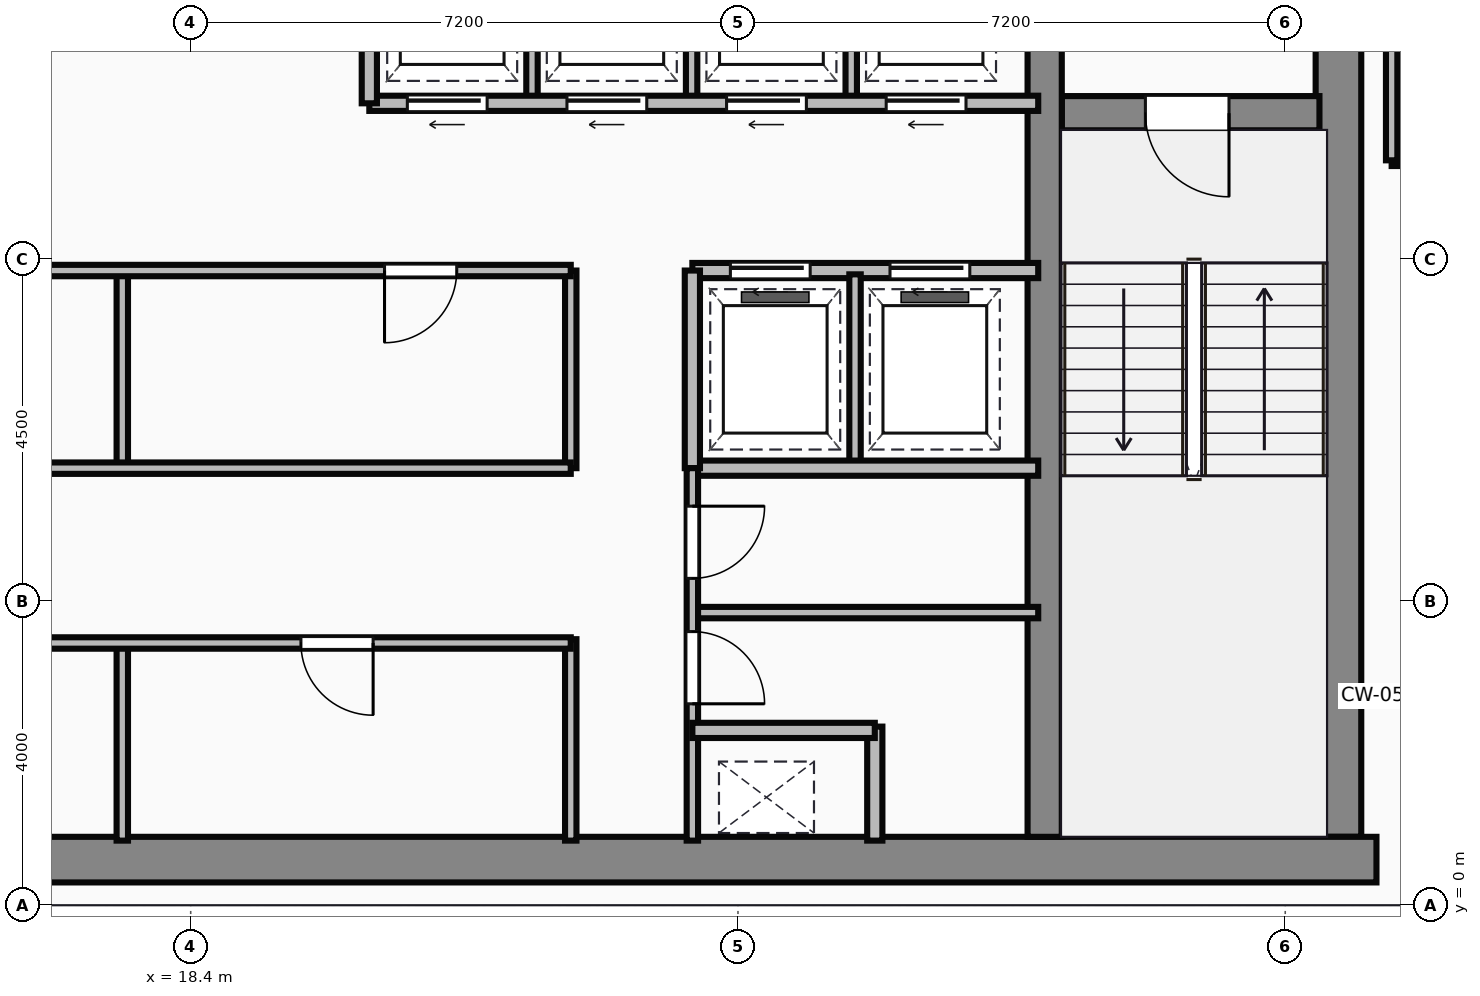
"""IFC4 building model, lengths in metres.
Left out: names, types, materials, properties, quantities, classifications, styles, units other than length and angle.
Written with IfcOpenShell. Run it as: python <this file> out.ifc"""

import sys

from ifc_helpers import new_model, si_unit, direction, frame, frame_2d, origin, place, context, subcontext, project, spatial, rectangle, extrude, source, transform, mapped, element, fill, save


model = new_model("IFC4")
c1 = context("Model", 3, precision=1e-05, world=origin(), true_north=direction((0.0, 1.0)))
c2 = subcontext(c1, "Body", "Model", "MODEL_VIEW")
j1 = project(units=[si_unit("LENGTHUNIT", "METRE"), si_unit("PLANEANGLEUNIT", "RADIAN")], contexts=[c1])
p1 = place(None, origin())
s1 = spatial("IfcSite", under=j1, at=p1, CompositionType="ELEMENT")
p2 = place(p1, origin())
s2 = spatial("IfcBuilding", under=s1, at=p2, CompositionType="ELEMENT")
p3 = place(p2, frame((0.0, 0.0, 266.1)))
s3 = spatial("IfcBuildingStorey", under=s2, at=p3, CompositionType="ELEMENT", Elevation=266.1)
m1 = source(origin(), c2, "Body", "SweptSolid", [
    extrude(rectangle(XDim=29.5, YDim=0.6, at=frame_2d((14.75, 0.0))), origin(), (0.0, 0.0, 1.0), 3.65),
])
p4 = place(p3, frame((4.5, 0.6, 0.0), z_axis=(0.0, 0.0, 1.0), x_axis=(1.0, 0.0, 0.0)))
e1 = element("IfcWall", 1, at=p4, inside=s3, PredefinedType="SHEAR", context=c2, shape_type="MappedRepresentation", body=[
    mapped(m1, transform((0.0, 0.0, 0.0))),
])
m2 = source(origin(), c2, "Body", "SweptSolid", [
    extrude(rectangle(XDim=13.1, YDim=0.6, at=frame_2d((6.55, 0.0))), origin(), (0.0, 0.0, 1.0), 3.65),
])
p5 = place(p3, frame((33.5, 0.9, 0.0), z_axis=(0.0, 0.0, 1.0), x_axis=(0.0, 1.0, 0.0)))
e2 = element("IfcWall", 2, at=p5, inside=s3, PredefinedType="SHEAR", context=c2, shape_type="MappedRepresentation", body=[
    mapped(m2, transform((0.0, 0.0, 0.0))),
])
m3 = source(origin(), c2, "Body", "SweptSolid", [
    extrude(rectangle(XDim=12.5, YDim=0.45, at=frame_2d((6.25, 0.0))), origin(), (0.0, 0.0, 1.0), 3.65),
])
p6 = place(p3, frame((29.635, 0.9, 0.0), z_axis=(0.0, 0.0, 1.0), x_axis=(0.0, 1.0, 0.0)))
e3 = element("IfcWall", 3, at=p6, inside=s3, PredefinedType="SHEAR", context=c2, shape_type="MappedRepresentation", body=[
    mapped(m3, transform((0.0, 0.0, 0.0))),
])
m4 = source(origin(), c2, "Body", "SweptSolid", [
    extrude(rectangle(XDim=3.39, YDim=0.45, at=frame_2d((1.695, 0.0))), origin(), (0.0, 0.0, 1.0), 3.65),
])
p7 = place(p3, frame((29.86, 10.42, 0.0), z_axis=(0.0, 0.0, 1.0), x_axis=(1.0, 0.0, 0.0)))
e4 = element("IfcWall", 4, at=p7, inside=s3, PredefinedType="SHEAR", context=c2, shape_type="MappedRepresentation", body=[
    mapped(m4, transform((0.0, 0.0, 0.0))),
])
p8 = place(p7, frame((1.1, 0.0, 0.0)))
e5 = element("IfcOpeningElement", 5, at=p8, cuts=e4, PredefinedType="OPENING", context=c2, shape_type="SweptSolid", body=[
    extrude(rectangle(XDim=1.1, YDim=2.15, at=frame_2d((0.55, 1.075))), frame((0.0, 0.235, 0.0), z_axis=(0.0, -1.0, 0.0), x_axis=(1.0, 0.0, 0.0)), (0.0, 0.0, 1.0), 0.47),
])
m5 = source(origin(), c2, "Body", "SweptSolid", [
    extrude(rectangle(XDim=10.35, YDim=0.15, at=frame_2d((5.175, 0.0))), origin(), (0.0, 0.0, 1.0), 3.4),
])
p9 = place(p3, frame((13.05, 3.45, 0.0), z_axis=(0.0, 0.0, 1.0), x_axis=(1.0, 0.0, 0.0)))
e6 = element("IfcWall", 6, at=p9, inside=s3, PredefinedType="PARTITIONING", context=c2, shape_type="MappedRepresentation", body=[
    mapped(m5, transform((0.0, 0.0, 0.0))),
])
p10 = place(p9, frame((2.1, 0.0, 0.0)))
e7 = element("IfcOpeningElement", 7, at=p10, cuts=e6, PredefinedType="OPENING", context=c2, shape_type="SweptSolid", body=[
    extrude(rectangle(XDim=0.95, YDim=2.15, at=frame_2d((0.475, 1.075))), frame((0.0, 0.085, 0.0), z_axis=(0.0, -1.0, 0.0), x_axis=(1.0, 0.0, 0.0)), (0.0, 0.0, 1.0), 0.17),
])
p11 = place(p9, frame((6.8, 0.0, 0.0)))
e8 = element("IfcOpeningElement", 8, at=p11, cuts=e6, PredefinedType="OPENING", context=c2, shape_type="SweptSolid", body=[
    extrude(rectangle(XDim=0.95, YDim=2.15, at=frame_2d((0.475, 1.075))), frame((0.0, 0.085, 0.0), z_axis=(0.0, -1.0, 0.0), x_axis=(1.0, 0.0, 0.0)), (0.0, 0.0, 1.0), 0.17),
])
m6 = source(origin(), c2, "Body", "SweptSolid", [
    extrude(rectangle(XDim=2.65, YDim=0.15, at=frame_2d((1.325, 0.0))), origin(), (0.0, 0.0, 1.0), 3.4),
])
p12 = place(p3, frame((23.4, 0.85, 0.0), z_axis=(0.0, 0.0, 1.0), x_axis=(0.0, 1.0, 0.0)))
e9 = element("IfcWall", 9, at=p12, inside=s3, PredefinedType="PARTITIONING", context=c2, shape_type="MappedRepresentation", body=[
    mapped(m6, transform((0.0, 0.0, 0.0))),
])
m7 = source(origin(), c2, "Body", "SweptSolid", [
    extrude(rectangle(XDim=2.6, YDim=0.15, at=frame_2d((1.3, 0.0))), origin(), (0.0, 0.0, 1.0), 3.4),
])
p13 = place(p3, frame((17.5, 0.85, 0.0), z_axis=(0.0, 0.0, 1.0), x_axis=(0.0, 1.0, 0.0)))
e10 = element("IfcWall", 10, at=p13, inside=s3, PredefinedType="PARTITIONING", context=c2, shape_type="MappedRepresentation", body=[
    mapped(m7, transform((0.0, 0.0, 0.0))),
])
m8 = source(origin(), c2, "Body", "SweptSolid", [
    extrude(rectangle(XDim=11.85, YDim=0.15, at=frame_2d((5.925, 0.0))), origin(), (0.0, 0.0, 1.0), 3.4),
])
p14 = place(p3, frame((11.55, 5.75, 0.0), z_axis=(0.0, 0.0, 1.0), x_axis=(1.0, 0.0, 0.0)))
e11 = element("IfcWall", 11, at=p14, inside=s3, PredefinedType="PARTITIONING", context=c2, shape_type="MappedRepresentation", body=[
    mapped(m8, transform((0.0, 0.0, 0.0))),
])
p15 = place(p3, frame((11.55, 8.35, 0.0), z_axis=(0.0, 0.0, 1.0), x_axis=(1.0, 0.0, 0.0)))
e12 = element("IfcWall", 12, at=p15, inside=s3, PredefinedType="PARTITIONING", context=c2, shape_type="MappedRepresentation", body=[
    mapped(m8, transform((0.0, 0.0, 0.0))),
])
p16 = place(p15, frame((1.1, 0.0, 0.0)))
e13 = element("IfcOpeningElement", 13, at=p16, cuts=e12, PredefinedType="OPENING", context=c2, shape_type="SweptSolid", body=[
    extrude(rectangle(XDim=0.95, YDim=2.15, at=frame_2d((0.475, 1.075))), frame((0.0, 0.085, 0.0), z_axis=(0.0, -1.0, 0.0), x_axis=(1.0, 0.0, 0.0)), (0.0, 0.0, 1.0), 0.17),
])
p17 = place(p15, frame((9.4, 0.0, 0.0)))
e14 = element("IfcOpeningElement", 14, at=p17, cuts=e12, PredefinedType="OPENING", context=c2, shape_type="SweptSolid", body=[
    extrude(rectangle(XDim=0.95, YDim=2.15, at=frame_2d((0.475, 1.075))), frame((0.0, 0.085, 0.0), z_axis=(0.0, -1.0, 0.0), x_axis=(1.0, 0.0, 0.0)), (0.0, 0.0, 1.0), 0.17),
])
m9 = source(origin(), c2, "Body", "SweptSolid", [
    extrude(rectangle(XDim=2.6, YDim=0.15, at=frame_2d((1.3, 0.0))), origin(), (0.0, 0.0, 1.0), 3.4),
])
p18 = place(p3, frame((23.4, 5.75, 0.0), z_axis=(0.0, 0.0, 1.0), x_axis=(0.0, 1.0, 0.0)))
e15 = element("IfcWall", 15, at=p18, inside=s3, PredefinedType="PARTITIONING", context=c2, shape_type="MappedRepresentation", body=[
    mapped(m9, transform((0.0, 0.0, 0.0))),
])
m10 = source(origin(), c2, "Body", "SweptSolid", [
    extrude(rectangle(XDim=2.5, YDim=0.15, at=frame_2d((1.25, 0.0))), origin(), (0.0, 0.0, 1.0), 3.4),
])
p19 = place(p3, frame((17.5, 5.8, 0.0), z_axis=(0.0, 0.0, 1.0), x_axis=(0.0, 1.0, 0.0)))
e16 = element("IfcWall", 16, at=p19, inside=s3, PredefinedType="PARTITIONING", context=c2, shape_type="MappedRepresentation", body=[
    mapped(m10, transform((0.0, 0.0, 0.0))),
])
m11 = source(origin(), c2, "Body", "SweptSolid", [
    extrude(rectangle(XDim=8.8, YDim=0.2, at=frame_2d((4.4, 0.0))), origin(), (0.0, 0.0, 1.0), 3.4),
])
p20 = place(p3, frame((20.75, 10.55, 0.0), z_axis=(0.0, 0.0, 1.0), x_axis=(1.0, 0.0, 0.0)))
e17 = element("IfcWall", 17, at=p20, inside=s3, PredefinedType="PARTITIONING", context=c2, shape_type="MappedRepresentation", body=[
    mapped(m11, transform((0.0, 0.0, 0.0))),
])
p21 = place(p20, frame((0.5, 0.0, 0.0)))
e18 = element("IfcOpeningElement", 18, at=p21, cuts=e17, PredefinedType="OPENING", context=c2, shape_type="SweptSolid", body=[
    extrude(rectangle(XDim=1.05, YDim=2.15, at=frame_2d((0.525, 1.075))), frame((0.0, 0.11, 0.0), z_axis=(0.0, -1.0, 0.0), x_axis=(1.0, 0.0, 0.0)), (0.0, 0.0, 1.0), 0.22),
])
p22 = place(p20, frame((2.6, 0.0, 0.0)))
e19 = element("IfcOpeningElement", 19, at=p22, cuts=e17, PredefinedType="OPENING", context=c2, shape_type="SweptSolid", body=[
    extrude(rectangle(XDim=1.05, YDim=2.15, at=frame_2d((0.525, 1.075))), frame((0.0, 0.11, 0.0), z_axis=(0.0, -1.0, 0.0), x_axis=(1.0, 0.0, 0.0)), (0.0, 0.0, 1.0), 0.22),
])
p23 = place(p20, frame((4.7, 0.0, 0.0)))
e20 = element("IfcOpeningElement", 20, at=p23, cuts=e17, PredefinedType="OPENING", context=c2, shape_type="SweptSolid", body=[
    extrude(rectangle(XDim=1.05, YDim=2.15, at=frame_2d((0.525, 1.075))), frame((0.0, 0.11, 0.0), z_axis=(0.0, -1.0, 0.0), x_axis=(1.0, 0.0, 0.0)), (0.0, 0.0, 1.0), 0.22),
])
p24 = place(p20, frame((6.8, 0.0, 0.0)))
e21 = element("IfcOpeningElement", 21, at=p24, cuts=e17, PredefinedType="OPENING", context=c2, shape_type="SweptSolid", body=[
    extrude(rectangle(XDim=1.05, YDim=2.15, at=frame_2d((0.525, 1.075))), frame((0.0, 0.11, 0.0), z_axis=(0.0, -1.0, 0.0), x_axis=(1.0, 0.0, 0.0)), (0.0, 0.0, 1.0), 0.22),
])
m12 = source(origin(), c2, "Body", "SweptSolid", [
    extrude(rectangle(XDim=3.0, YDim=0.2, at=frame_2d((1.5, 0.0))), origin(), (0.0, 0.0, 1.0), 3.4),
])
p25 = place(p3, frame((20.75, 10.55, 0.0), z_axis=(0.0, 0.0, 1.0), x_axis=(0.0, 1.0, 0.0)))
e22 = element("IfcWall", 22, at=p25, inside=s3, PredefinedType="PARTITIONING", context=c2, shape_type="MappedRepresentation", body=[
    mapped(m12, transform((0.0, 0.0, 0.0))),
])
m13 = source(origin(), c2, "Body", "SweptSolid", [
    extrude(rectangle(XDim=2.85, YDim=0.15, at=frame_2d((1.425, 0.0))), origin(), (0.0, 0.0, 1.0), 3.4),
])
for number, where, z_axis, x_axis in (
    (23, (22.89, 10.6, 0.0), (0.0, 0.0, 1.0), (0.0, 1.0, 0.0)),
    (24, (24.99, 10.6, 0.0), (0.0, 0.0, 1.0), (0.0, 1.0, 0.0)),
    (25, (27.09, 10.6, 0.0), (0.0, 0.0, 1.0), (0.0, 1.0, 0.0)),
):
    element("IfcWall", number, at=place(p3, frame(where, z_axis=z_axis, x_axis=x_axis)), inside=s3, PredefinedType="PARTITIONING", context=c2, shape_type="MappedRepresentation", body=[
        mapped(m13, transform((0.0, 0.0, 0.0))),
    ])
m14 = source(origin(), c2, "Body", "SweptSolid", [
    extrude(rectangle(XDim=4.55, YDim=0.2, at=frame_2d((2.275, 0.0))), origin(), (0.0, 0.0, 1.0), 3.4),
])
p26 = place(p3, frame((25.0, 8.35, 0.0), z_axis=(0.0, 0.0, 1.0), x_axis=(1.0, 0.0, 0.0)))
e26 = element("IfcWall", 26, at=p26, inside=s3, PredefinedType="PARTITIONING", context=c2, shape_type="MappedRepresentation", body=[
    mapped(m14, transform((0.0, 0.0, 0.0))),
])
p27 = place(p26, frame((0.5, 0.0, 0.0)))
e27 = element("IfcOpeningElement", 27, at=p27, cuts=e26, PredefinedType="OPENING", context=c2, shape_type="SweptSolid", body=[
    extrude(rectangle(XDim=1.05, YDim=2.15, at=frame_2d((0.525, 1.075))), frame((0.0, 0.11, 0.0), z_axis=(0.0, -1.0, 0.0), x_axis=(1.0, 0.0, 0.0)), (0.0, 0.0, 1.0), 0.22),
])
p28 = place(p26, frame((2.6, 0.0, 0.0)))
e28 = element("IfcOpeningElement", 28, at=p28, cuts=e26, PredefinedType="OPENING", context=c2, shape_type="SweptSolid", body=[
    extrude(rectangle(XDim=1.05, YDim=2.15, at=frame_2d((0.525, 1.075))), frame((0.0, 0.11, 0.0), z_axis=(0.0, -1.0, 0.0), x_axis=(1.0, 0.0, 0.0)), (0.0, 0.0, 1.0), 0.22),
])
p29 = place(p3, frame((25.0, 5.75, 0.0), z_axis=(0.0, 0.0, 1.0), x_axis=(1.0, 0.0, 0.0)))
e29 = element("IfcWall", 29, at=p29, inside=s3, PredefinedType="PARTITIONING", context=c2, shape_type="MappedRepresentation", body=[
    mapped(m14, transform((0.0, 0.0, 0.0))),
])
m15 = source(origin(), c2, "Body", "SweptSolid", [
    extrude(rectangle(XDim=2.6, YDim=0.2, at=frame_2d((1.3, 0.0))), origin(), (0.0, 0.0, 1.0), 3.4),
])
p30 = place(p3, frame((25.0, 5.75, 0.0), z_axis=(0.0, 0.0, 1.0), x_axis=(0.0, 1.0, 0.0)))
e30 = element("IfcWall", 30, at=p30, inside=s3, PredefinedType="PARTITIONING", context=c2, shape_type="MappedRepresentation", body=[
    mapped(m15, transform((0.0, 0.0, 0.0))),
])
p31 = place(p3, frame((27.14, 5.8, 0.0), z_axis=(0.0, 0.0, 1.0), x_axis=(0.0, 1.0, 0.0)))
e31 = element("IfcWall", 31, at=p31, inside=s3, PredefinedType="PARTITIONING", context=c2, shape_type="MappedRepresentation", body=[
    mapped(m10, transform((0.0, 0.0, 0.0))),
])
m16 = source(origin(), c2, "Body", "SweptSolid", [
    extrude(rectangle(XDim=4.9, YDim=0.15, at=frame_2d((2.45, 0.0))), origin(), (0.0, 0.0, 1.0), 3.4),
])
p32 = place(p3, frame((25.0, 0.85, 0.0), z_axis=(0.0, 0.0, 1.0), x_axis=(0.0, 1.0, 0.0)))
e32 = element("IfcWall", 32, at=p32, inside=s3, PredefinedType="PARTITIONING", context=c2, shape_type="MappedRepresentation", body=[
    mapped(m16, transform((0.0, 0.0, 0.0))),
])
p33 = place(p32, frame((1.8, 0.0, 0.0)))
e33 = element("IfcOpeningElement", 33, at=p33, cuts=e32, PredefinedType="OPENING", context=c2, shape_type="SweptSolid", body=[
    extrude(rectangle(XDim=0.95, YDim=2.15, at=frame_2d((0.475, 1.075))), frame((0.0, 0.085, 0.0), z_axis=(0.0, -1.0, 0.0), x_axis=(1.0, 0.0, 0.0)), (0.0, 0.0, 1.0), 0.17),
])
p34 = place(p32, frame((3.45, 0.0, 0.0)))
e34 = element("IfcOpeningElement", 34, at=p34, cuts=e32, PredefinedType="OPENING", context=c2, shape_type="SweptSolid", body=[
    extrude(rectangle(XDim=0.95, YDim=2.15, at=frame_2d((0.475, 1.075))), frame((0.0, 0.085, 0.0), z_axis=(0.0, -1.0, 0.0), x_axis=(1.0, 0.0, 0.0)), (0.0, 0.0, 1.0), 0.17),
])
m17 = source(origin(), c2, "Body", "SweptSolid", [
    extrude(rectangle(XDim=2.4, YDim=0.2, at=frame_2d((1.2, 0.0))), origin(), (0.0, 0.0, 1.0), 3.4),
])
p35 = place(p3, frame((25.0, 2.3, 0.0), z_axis=(0.0, 0.0, 1.0), x_axis=(1.0, 0.0, 0.0)))
e35 = element("IfcWall", 35, at=p35, inside=s3, PredefinedType="PARTITIONING", context=c2, shape_type="MappedRepresentation", body=[
    mapped(m17, transform((0.0, 0.0, 0.0))),
])
m18 = source(origin(), c2, "Body", "SweptSolid", [
    extrude(rectangle(XDim=1.5, YDim=0.2, at=frame_2d((0.75, 0.0))), origin(), (0.0, 0.0, 1.0), 3.4),
])
p36 = place(p3, frame((27.4, 0.85, 0.0), z_axis=(0.0, 0.0, 1.0), x_axis=(0.0, 1.0, 0.0)))
e36 = element("IfcWall", 36, at=p36, inside=s3, PredefinedType="PARTITIONING", context=c2, shape_type="MappedRepresentation", body=[
    mapped(m18, transform((0.0, 0.0, 0.0))),
])
m19 = source(origin(), c2, "Body", "SweptSolid", [
    extrude(rectangle(XDim=4.55, YDim=0.15, at=frame_2d((2.275, 0.0))), origin(), (0.0, 0.0, 1.0), 3.4),
])
p37 = place(p3, frame((25.0, 3.85, 0.0), z_axis=(0.0, 0.0, 1.0), x_axis=(1.0, 0.0, 0.0)))
e37 = element("IfcWall", 37, at=p37, inside=s3, PredefinedType="PARTITIONING", context=c2, shape_type="MappedRepresentation", body=[
    mapped(m19, transform((0.0, 0.0, 0.0))),
])
m20 = source(origin(), c2, "Body", "SweptSolid", [
    extrude(rectangle(XDim=4.8, YDim=0.15, at=frame_2d((2.4, 0.0))), origin(), (0.0, 0.0, 1.0), 3.4),
])
p38 = place(p3, frame((34.2, 9.8, 0.0), z_axis=(0.0, 0.0, 1.0), x_axis=(1.0, 0.0, 0.0)))
e38 = element("IfcWall", 38, at=p38, inside=s3, PredefinedType="PARTITIONING", context=c2, shape_type="MappedRepresentation", body=[
    mapped(m20, transform((0.0, 0.0, 0.0))),
])
m21 = source(origin(), c2, "Body", "SweptSolid", [
    extrude(rectangle(XDim=4.18, YDim=0.15, at=frame_2d((2.09, 0.0))), origin(), (0.0, 0.0, 1.0), 3.4),
])
p39 = place(p3, frame((34.2, 9.8, 0.0), z_axis=(0.0, 0.0, 1.0), x_axis=(0.0, 1.0, 0.0)))
e39 = element("IfcWall", 39, at=p39, inside=s3, PredefinedType="PARTITIONING", context=c2, shape_type="MappedRepresentation", body=[
    mapped(m21, transform((0.0, 0.0, 0.0))),
])
m22 = source(origin(), c2, "Body", "SweptSolid", [
    extrude(rectangle(XDim=1.1, YDim=2.15, at=frame_2d((0.55, 1.075))), frame((0.0, 0.025, 0.0), z_axis=(0.0, -1.0, 0.0), x_axis=(1.0, 0.0, 0.0)), (0.0, 0.0, 1.0), 0.05),
])
p40 = place(p8, frame((1.1, 0.0, 0.0), z_axis=(0.0, 0.0, 1.0), x_axis=(-1.0, 0.0, 0.0)))
e40 = element("IfcDoor", 40, at=p40, inside=s3, OperationType="SINGLE_SWING_RIGHT", PredefinedType="DOOR", context=c2, shape_type="MappedRepresentation", body=[
    mapped(m22, transform((0.0, 0.0, 0.0))),
])
fill(e5, e40)
m23 = source(origin(), c2, "Body", "SweptSolid", [
    extrude(rectangle(XDim=0.95, YDim=2.15, at=frame_2d((0.475, 1.075))), frame((0.0, 0.025, 0.0), z_axis=(0.0, -1.0, 0.0), x_axis=(1.0, 0.0, 0.0)), (0.0, 0.0, 1.0), 0.05),
])
p41 = place(p11, origin())
e41 = element("IfcDoor", 41, at=p41, inside=s3, OperationType="SINGLE_SWING_RIGHT", PredefinedType="DOOR", context=c2, shape_type="MappedRepresentation", body=[
    mapped(m23, transform((0.0, 0.0, 0.0))),
])
fill(e8, e41)
p42 = place(p17, origin())
e42 = element("IfcDoor", 42, at=p42, inside=s3, OperationType="SINGLE_SWING_LEFT", PredefinedType="DOOR", context=c2, shape_type="MappedRepresentation", body=[
    mapped(m23, transform((0.0, 0.0, 0.0))),
])
fill(e14, e42)
m24 = source(origin(), c2, "Body", "SweptSolid", [
    extrude(rectangle(XDim=1.05, YDim=2.15, at=frame_2d((0.525, 1.075))), frame((0.0, 0.025, 0.0), z_axis=(0.0, -1.0, 0.0), x_axis=(1.0, 0.0, 0.0)), (0.0, 0.0, 1.0), 0.05),
])
p43 = place(p21, frame((1.05, 0.0, 0.0), z_axis=(0.0, 0.0, 1.0), x_axis=(-1.0, 0.0, 0.0)))
e43 = element("IfcDoor", 43, at=p43, inside=s3, OperationType="SLIDING_TO_LEFT", PredefinedType="DOOR", context=c2, shape_type="MappedRepresentation", body=[
    mapped(m24, transform((0.0, 0.0, 0.0))),
])
fill(e18, e43)
p44 = place(p22, frame((1.05, 0.0, 0.0), z_axis=(0.0, 0.0, 1.0), x_axis=(-1.0, 0.0, 0.0)))
e44 = element("IfcDoor", 44, at=p44, inside=s3, OperationType="SLIDING_TO_LEFT", PredefinedType="DOOR", context=c2, shape_type="MappedRepresentation", body=[
    mapped(m24, transform((0.0, 0.0, 0.0))),
])
fill(e19, e44)
p45 = place(p23, frame((1.05, 0.0, 0.0), z_axis=(0.0, 0.0, 1.0), x_axis=(-1.0, 0.0, 0.0)))
e45 = element("IfcDoor", 45, at=p45, inside=s3, OperationType="SLIDING_TO_LEFT", PredefinedType="DOOR", context=c2, shape_type="MappedRepresentation", body=[
    mapped(m24, transform((0.0, 0.0, 0.0))),
])
fill(e20, e45)
p46 = place(p24, frame((1.05, 0.0, 0.0), z_axis=(0.0, 0.0, 1.0), x_axis=(-1.0, 0.0, 0.0)))
e46 = element("IfcDoor", 46, at=p46, inside=s3, OperationType="SLIDING_TO_LEFT", PredefinedType="DOOR", context=c2, shape_type="MappedRepresentation", body=[
    mapped(m24, transform((0.0, 0.0, 0.0))),
])
fill(e21, e46)
p47 = place(p27, origin())
e47 = element("IfcDoor", 47, at=p47, inside=s3, OperationType="SLIDING_TO_LEFT", PredefinedType="DOOR", context=c2, shape_type="MappedRepresentation", body=[
    mapped(m24, transform((0.0, 0.0, 0.0))),
])
fill(e27, e47)
p48 = place(p28, origin())
e48 = element("IfcDoor", 48, at=p48, inside=s3, OperationType="SLIDING_TO_LEFT", PredefinedType="DOOR", context=c2, shape_type="MappedRepresentation", body=[
    mapped(m24, transform((0.0, 0.0, 0.0))),
])
fill(e28, e48)
p49 = place(p33, origin())
e49 = element("IfcDoor", 49, at=p49, inside=s3, OperationType="SINGLE_SWING_LEFT", PredefinedType="DOOR", context=c2, shape_type="MappedRepresentation", body=[
    mapped(m23, transform((0.0, 0.0, 0.0))),
])
fill(e33, e49)
p50 = place(p34, origin())
e50 = element("IfcDoor", 50, at=p50, inside=s3, OperationType="SINGLE_SWING_RIGHT", PredefinedType="DOOR", context=c2, shape_type="MappedRepresentation", body=[
    mapped(m23, transform((0.0, 0.0, 0.0))),
])
fill(e34, e50)
save(model, sys.argv[1])
